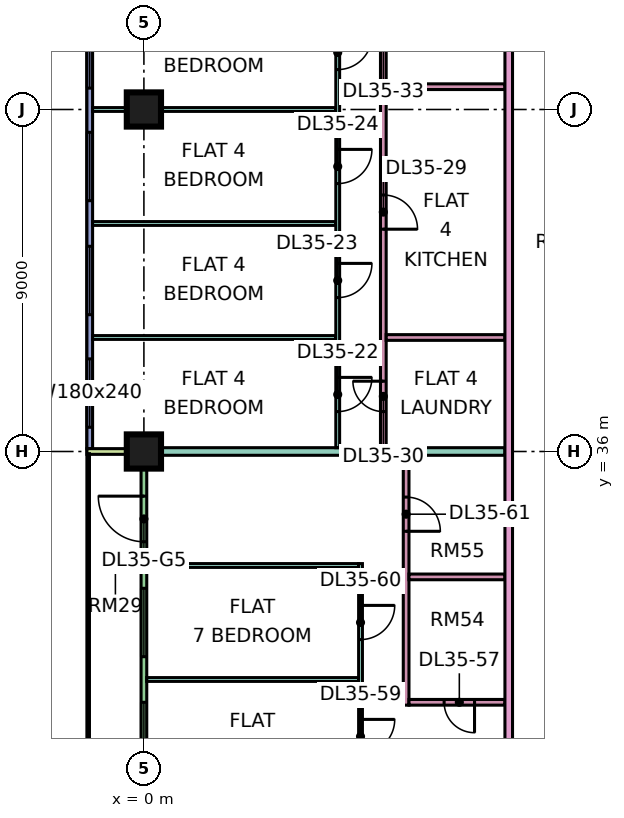
"""IFC4 building model, lengths in metres.
Left out: names, types, materials, properties, quantities, classifications, styles, units other than length and angle.
Written with IfcOpenShell. Run it as: python <this file> out.ifc"""

import sys

from ifc_helpers import new_model, si_unit, direction, frame, frame_2d, origin, origin_2d, place, context, subcontext, project, spatial, rectangle, extrude, element, fill, save


model = new_model("IFC4")
c1 = context("Model", 3, precision=1e-05, world=origin(), true_north=direction((0.0, 1.0)))
c2 = subcontext(c1, "Body", "Model", "MODEL_VIEW")
j1 = project(units=[si_unit("LENGTHUNIT", "METRE"), si_unit("PLANEANGLEUNIT", "RADIAN")], contexts=[c1])
p1 = place(None, origin())
s1 = spatial("IfcSite", under=j1, at=p1, CompositionType="ELEMENT")
p2 = place(p1, origin())
s2 = spatial("IfcBuilding", under=s1, at=p2, CompositionType="ELEMENT")
p3 = place(p2, frame((0.0, 0.0, 157.4)))
s3 = spatial("IfcBuildingStorey", under=s2, at=p3, CompositionType="ELEMENT", Elevation=157.4)
p4 = place(p3, frame((0.0, 36.0, 0.0), z_axis=(0.0, 0.0, 1.0), x_axis=(1.0, 0.0, 0.0)))
e1 = element("IfcColumn", 1, at=p4, inside=s3, PredefinedType="COLUMN", context=c2, shape_type="SweptSolid", body=[
    extrude(rectangle(XDim=0.9, YDim=0.9, at=origin_2d()), origin(), (0.0, 0.0, 1.0), 3.75),
])
p5 = place(p3, frame((0.0, 45.0, 0.0), z_axis=(0.0, 0.0, 1.0), x_axis=(1.0, 0.0, 0.0)))
e2 = element("IfcColumn", 2, at=p5, inside=s3, PredefinedType="COLUMN", context=c2, shape_type="SweptSolid", body=[
    extrude(rectangle(XDim=0.9, YDim=0.9, at=origin_2d()), origin(), (0.0, 0.0, 1.0), 3.75),
])
p6 = place(p3, frame((-1.425, 47.925, 0.0), z_axis=(0.0, 0.0, 1.0), x_axis=(0.0, -1.0, 0.0)))
e3 = element("IfcWall", 3, at=p6, inside=s3, PredefinedType="SOLIDWALL", context=c2, shape_type="SweptSolid", body=[
    extrude(rectangle(XDim=11.85, YDim=0.15, at=frame_2d((5.925, 0.0))), origin(), (0.0, 0.0, 1.0), 3.35),
])
p7 = place(p6, frame((0.562, 0.0, 0.45)))
e4 = element("IfcOpeningElement", 4, at=p7, cuts=e3, PredefinedType="OPENING", context=c2, shape_type="SweptSolid", body=[
    extrude(rectangle(XDim=1.8, YDim=2.4, at=frame_2d((0.9, 1.2))), frame((0.0, 0.085, 0.0), z_axis=(0.0, -1.0, 0.0), x_axis=(1.0, 0.0, 0.0)), (0.0, 0.0, 1.0), 0.17),
])
p8 = place(p6, frame((3.525, 0.0, 0.45)))
e5 = element("IfcOpeningElement", 5, at=p8, cuts=e3, PredefinedType="OPENING", context=c2, shape_type="SweptSolid", body=[
    extrude(rectangle(XDim=1.8, YDim=2.4, at=frame_2d((0.9, 1.2))), frame((0.0, 0.085, 0.0), z_axis=(0.0, -1.0, 0.0), x_axis=(1.0, 0.0, 0.0)), (0.0, 0.0, 1.0), 0.17),
])
p9 = place(p6, frame((6.525, 0.0, 0.45)))
e6 = element("IfcOpeningElement", 6, at=p9, cuts=e3, PredefinedType="OPENING", context=c2, shape_type="SweptSolid", body=[
    extrude(rectangle(XDim=1.8, YDim=2.4, at=frame_2d((0.9, 1.2))), frame((0.0, 0.085, 0.0), z_axis=(0.0, -1.0, 0.0), x_axis=(1.0, 0.0, 0.0)), (0.0, 0.0, 1.0), 0.17),
])
p10 = place(p6, frame((9.488, 0.0, 0.45)))
e7 = element("IfcOpeningElement", 7, at=p10, cuts=e3, PredefinedType="OPENING", context=c2, shape_type="SweptSolid", body=[
    extrude(rectangle(XDim=1.8, YDim=2.4, at=frame_2d((0.9, 1.2))), frame((0.0, 0.085, 0.0), z_axis=(0.0, -1.0, 0.0), x_axis=(1.0, 0.0, 0.0)), (0.0, 0.0, 1.0), 0.17),
])
p11 = place(p3, frame((0.0, 35.925, 0.0), z_axis=(0.0, 0.0, 1.0), x_axis=(0.0, -1.0, 0.0)))
e8 = element("IfcWall", 8, at=p11, inside=s3, PredefinedType="SOLIDWALL", context=c2, shape_type="SweptSolid", body=[
    extrude(rectangle(XDim=11.85, YDim=0.15, at=frame_2d((5.925, 0.0))), origin(), (0.0, 0.0, 1.0), 3.35),
])
p12 = place(p11, frame((1.1, 0.0, 0.0)))
e9 = element("IfcOpeningElement", 9, at=p12, cuts=e8, PredefinedType="OPENING", context=c2, shape_type="SweptSolid", body=[
    extrude(rectangle(XDim=1.2, YDim=2.4, at=frame_2d((0.6, 1.2))), frame((0.0, 0.085, 0.0), z_axis=(0.0, -1.0, 0.0), x_axis=(1.0, 0.0, 0.0)), (0.0, 0.0, 1.0), 0.17),
])
p13 = place(p11, frame((3.525, 0.0, 0.45)))
e10 = element("IfcOpeningElement", 10, at=p13, cuts=e8, PredefinedType="OPENING", context=c2, shape_type="SweptSolid", body=[
    extrude(rectangle(XDim=1.8, YDim=2.4, at=frame_2d((0.9, 1.2))), frame((0.0, 0.085, 0.0), z_axis=(0.0, -1.0, 0.0), x_axis=(1.0, 0.0, 0.0)), (0.0, 0.0, 1.0), 0.17),
])
p14 = place(p11, frame((6.525, 0.0, 0.45)))
e11 = element("IfcOpeningElement", 11, at=p14, cuts=e8, PredefinedType="OPENING", context=c2, shape_type="SweptSolid", body=[
    extrude(rectangle(XDim=1.8, YDim=2.4, at=frame_2d((0.9, 1.2))), frame((0.0, 0.085, 0.0), z_axis=(0.0, -1.0, 0.0), x_axis=(1.0, 0.0, 0.0)), (0.0, 0.0, 1.0), 0.17),
])
p15 = place(p11, frame((9.55, 0.0, 0.45)))
e12 = element("IfcOpeningElement", 12, at=p15, cuts=e8, PredefinedType="OPENING", context=c2, shape_type="SweptSolid", body=[
    extrude(rectangle(XDim=1.2, YDim=2.4, at=frame_2d((0.6, 1.2))), frame((0.0, 0.085, 0.0), z_axis=(0.0, -1.0, 0.0), x_axis=(1.0, 0.0, 0.0)), (0.0, 0.0, 1.0), 0.17),
])
p16 = place(p3, frame((-1.5, 36.0, 0.0), z_axis=(0.0, 0.0, 1.0), x_axis=(1.0, 0.0, 0.0)))
e13 = element("IfcWall", 13, at=p16, inside=s3, PredefinedType="SOLIDWALL", context=c2, shape_type="SweptSolid", body=[
    extrude(rectangle(XDim=1.5, YDim=0.15, at=frame_2d((0.75, 0.0))), origin(), (0.0, 0.0, 1.0), 3.35),
])
for number, where, z_axis, x_axis in (
    (14, (-1.351, 39.0, 0.0), (0.0, 0.0, 1.0), (1.0, 0.0, 0.0)),
    (15, (-1.351, 42.0, 0.0), (0.0, 0.0, 1.0), (1.0, 0.0, 0.0)),
    (16, (-1.351, 45.0, 0.0), (0.0, 0.0, 1.0), (1.0, 0.0, 0.0)),
):
    element("IfcWall", number, at=place(p3, frame(where, z_axis=z_axis, x_axis=x_axis)), inside=s3, PredefinedType="PARTITIONING", context=c2, shape_type="SweptSolid", body=[
        extrude(rectangle(XDim=6.401, YDim=0.1, at=frame_2d((3.201, 0.0))), origin(), (0.0, 0.0, 1.0), 3.35),
    ])
e17 = element("IfcWall", 17, at=p4, inside=s3, PredefinedType="PARTITIONING", context=c2, shape_type="SweptSolid", body=[
    extrude(rectangle(XDim=9.5, YDim=0.2, at=frame_2d((4.75, 0.0))), origin(), (0.0, 0.0, 1.0), 3.35),
])
for number, where, z_axis, x_axis in (
    (18, (0.074, 30.0, 0.0), (0.0, 0.0, 1.0), (1.0, 0.0, 0.0)),
    (19, (0.074, 33.0, 0.0), (0.0, 0.0, 1.0), (1.0, 0.0, 0.0)),
):
    element("IfcWall", number, at=place(p3, frame(where, z_axis=z_axis, x_axis=x_axis)), inside=s3, PredefinedType="PARTITIONING", context=c2, shape_type="SweptSolid", body=[
        extrude(rectangle(XDim=5.576, YDim=0.1, at=frame_2d((2.788, 0.0))), origin(), (0.0, 0.0, 1.0), 3.35),
    ])
p17 = place(p3, frame((5.1, 36.1, 0.0), z_axis=(0.0, 0.0, 1.0), x_axis=(0.0, 1.0, 0.0)))
e20 = element("IfcWall", 20, at=p17, inside=s3, PredefinedType="PARTITIONING", context=c2, shape_type="SweptSolid", body=[
    extrude(rectangle(XDim=26.826, YDim=0.1, at=frame_2d((13.413, 0.0))), origin(), (0.0, 0.0, 1.0), 3.35),
])
p18 = place(p17, frame((0.95, 0.0, 0.0)))
e21 = element("IfcOpeningElement", 21, at=p18, cuts=e20, PredefinedType="OPENING", context=c2, shape_type="SweptSolid", body=[
    extrude(rectangle(XDim=0.9, YDim=2.1, at=frame_2d((0.45, 1.05))), frame((0.0, 0.06, 0.0), z_axis=(0.0, -1.0, 0.0), x_axis=(1.0, 0.0, 0.0)), (0.0, 0.0, 1.0), 0.12),
])
p19 = place(p17, frame((3.95, 0.0, 0.0)))
e22 = element("IfcOpeningElement", 22, at=p19, cuts=e20, PredefinedType="OPENING", context=c2, shape_type="SweptSolid", body=[
    extrude(rectangle(XDim=0.9, YDim=2.1, at=frame_2d((0.45, 1.05))), frame((0.0, 0.06, 0.0), z_axis=(0.0, -1.0, 0.0), x_axis=(1.0, 0.0, 0.0)), (0.0, 0.0, 1.0), 0.12),
])
p20 = place(p17, frame((6.95, 0.0, 0.0)))
e23 = element("IfcOpeningElement", 23, at=p20, cuts=e20, PredefinedType="OPENING", context=c2, shape_type="SweptSolid", body=[
    extrude(rectangle(XDim=0.9, YDim=2.1, at=frame_2d((0.45, 1.05))), frame((0.0, 0.06, 0.0), z_axis=(0.0, -1.0, 0.0), x_axis=(1.0, 0.0, 0.0)), (0.0, 0.0, 1.0), 0.12),
])
p21 = place(p17, frame((9.95, 0.0, 0.0)))
e24 = element("IfcOpeningElement", 24, at=p21, cuts=e20, PredefinedType="OPENING", context=c2, shape_type="SweptSolid", body=[
    extrude(rectangle(XDim=0.9, YDim=2.1, at=frame_2d((0.45, 1.05))), frame((0.0, 0.06, 0.0), z_axis=(0.0, -1.0, 0.0), x_axis=(1.0, 0.0, 0.0)), (0.0, 0.0, 1.0), 0.12),
])
p22 = place(p17, frame((21.95, 0.0, 0.0)))
e25 = element("IfcOpeningElement", 25, at=p22, cuts=e20, PredefinedType="OPENING", context=c2, shape_type="SweptSolid", body=[
    extrude(rectangle(XDim=0.9, YDim=2.1, at=frame_2d((0.45, 1.05))), frame((0.0, 0.06, 0.0), z_axis=(0.0, -1.0, 0.0), x_axis=(1.0, 0.0, 0.0)), (0.0, 0.0, 1.0), 0.12),
])
p23 = place(p17, frame((15.95, 0.0, 0.0)))
e26 = element("IfcOpeningElement", 26, at=p23, cuts=e20, PredefinedType="OPENING", context=c2, shape_type="SweptSolid", body=[
    extrude(rectangle(XDim=0.9, YDim=2.1, at=frame_2d((0.45, 1.05))), frame((0.0, 0.06, 0.0), z_axis=(0.0, -1.0, 0.0), x_axis=(1.0, 0.0, 0.0)), (0.0, 0.0, 1.0), 0.12),
])
p24 = place(p17, frame((24.95, 0.0, 0.0)))
e27 = element("IfcOpeningElement", 27, at=p24, cuts=e20, PredefinedType="OPENING", context=c2, shape_type="SweptSolid", body=[
    extrude(rectangle(XDim=0.9, YDim=2.1, at=frame_2d((0.45, 1.05))), frame((0.0, 0.06, 0.0), z_axis=(0.0, -1.0, 0.0), x_axis=(1.0, 0.0, 0.0)), (0.0, 0.0, 1.0), 0.12),
])
p25 = place(p3, frame((5.7, 22.5, 0.0), z_axis=(0.0, 0.0, 1.0), x_axis=(0.0, 1.0, 0.0)))
e28 = element("IfcWall", 28, at=p25, inside=s3, PredefinedType="PARTITIONING", context=c2, shape_type="SweptSolid", body=[
    extrude(rectangle(XDim=10.55, YDim=0.1, at=frame_2d((5.275, 0.0))), origin(), (0.0, 0.0, 1.0), 3.35),
])
p26 = place(p25, frame((1.8, 0.0, 0.0)))
e29 = element("IfcOpeningElement", 29, at=p26, cuts=e28, PredefinedType="OPENING", context=c2, shape_type="SweptSolid", body=[
    extrude(rectangle(XDim=0.9, YDim=2.1, at=frame_2d((0.45, 1.05))), frame((0.0, 0.06, 0.0), z_axis=(0.0, -1.0, 0.0), x_axis=(1.0, 0.0, 0.0)), (0.0, 0.0, 1.0), 0.12),
])
p27 = place(p25, frame((5.55, 0.0, 0.0)))
e30 = element("IfcOpeningElement", 30, at=p27, cuts=e28, PredefinedType="OPENING", context=c2, shape_type="SweptSolid", body=[
    extrude(rectangle(XDim=0.9, YDim=2.1, at=frame_2d((0.45, 1.05))), frame((0.0, 0.06, 0.0), z_axis=(0.0, -1.0, 0.0), x_axis=(1.0, 0.0, 0.0)), (0.0, 0.0, 1.0), 0.12),
])
p28 = place(p25, frame((8.55, 0.0, 0.0)))
e31 = element("IfcOpeningElement", 31, at=p28, cuts=e28, PredefinedType="OPENING", context=c2, shape_type="SweptSolid", body=[
    extrude(rectangle(XDim=0.9, YDim=2.1, at=frame_2d((0.45, 1.05))), frame((0.0, 0.06, 0.0), z_axis=(0.0, -1.0, 0.0), x_axis=(1.0, 0.0, 0.0)), (0.0, 0.0, 1.0), 0.12),
])
p29 = place(p3, frame((6.3, 36.1, 0.0), z_axis=(0.0, 0.0, 1.0), x_axis=(0.0, 1.0, 0.0)))
e32 = element("IfcWall", 32, at=p29, inside=s3, PredefinedType="PARTITIONING", context=c2, shape_type="SweptSolid", body=[
    extrude(rectangle(XDim=23.65, YDim=0.15, at=frame_2d((11.825, 0.0))), origin(), (0.0, 0.0, 1.0), 3.35),
])
p30 = place(p29, frame((15.95, 0.0, 0.0)))
e33 = element("IfcOpeningElement", 33, at=p30, cuts=e32, PredefinedType="OPENING", context=c2, shape_type="SweptSolid", body=[
    extrude(rectangle(XDim=0.8, YDim=2.1, at=frame_2d((0.4, 1.05))), frame((0.0, 0.085, 0.0), z_axis=(0.0, -1.0, 0.0), x_axis=(1.0, 0.0, 0.0)), (0.0, 0.0, 1.0), 0.17),
])
p31 = place(p29, frame((5.75, 0.0, 0.0)))
e34 = element("IfcOpeningElement", 34, at=p31, cuts=e32, PredefinedType="OPENING", context=c2, shape_type="SweptSolid", body=[
    extrude(rectangle(XDim=0.9, YDim=2.1, at=frame_2d((0.45, 1.05))), frame((0.0, 0.085, 0.0), z_axis=(0.0, -1.0, 0.0), x_axis=(1.0, 0.0, 0.0)), (0.0, 0.0, 1.0), 0.17),
])
p32 = place(p29, frame((0.95, 0.0, 0.0)))
e35 = element("IfcOpeningElement", 35, at=p32, cuts=e32, PredefinedType="OPENING", context=c2, shape_type="SweptSolid", body=[
    extrude(rectangle(XDim=0.8, YDim=2.1, at=frame_2d((0.4, 1.05))), frame((0.0, 0.085, 0.0), z_axis=(0.0, -1.0, 0.0), x_axis=(1.0, 0.0, 0.0)), (0.0, 0.0, 1.0), 0.17),
])
p33 = place(p29, frame((10.55, 0.0, 0.0)))
e36 = element("IfcOpeningElement", 36, at=p33, cuts=e32, PredefinedType="OPENING", context=c2, shape_type="SweptSolid", body=[
    extrude(rectangle(XDim=0.8, YDim=2.1, at=frame_2d((0.4, 1.05))), frame((0.0, 0.085, 0.0), z_axis=(0.0, -1.0, 0.0), x_axis=(1.0, 0.0, 0.0)), (0.0, 0.0, 1.0), 0.17),
])
p34 = place(p29, frame((13.4, 0.0, 0.0)))
e37 = element("IfcOpeningElement", 37, at=p34, cuts=e32, PredefinedType="OPENING", context=c2, shape_type="SweptSolid", body=[
    extrude(rectangle(XDim=0.8, YDim=2.1, at=frame_2d((0.4, 1.05))), frame((0.0, 0.085, 0.0), z_axis=(0.0, -1.0, 0.0), x_axis=(1.0, 0.0, 0.0)), (0.0, 0.0, 1.0), 0.17),
])
for number, where, z_axis, x_axis in (
    (38, (6.375, 39.0, 0.0), (0.0, 0.0, 1.0), (1.0, 0.0, 0.0)),
    (39, (6.375, 45.6, 0.0), (0.0, 0.0, 1.0), (1.0, 0.0, 0.0)),
):
    element("IfcWall", number, at=place(p3, frame(where, z_axis=z_axis, x_axis=x_axis)), inside=s3, PredefinedType="PARTITIONING", context=c2, shape_type="SweptSolid", body=[
        extrude(rectangle(XDim=3.125, YDim=0.15, at=frame_2d((1.562, 0.0))), origin(), (0.0, 0.0, 1.0), 3.35),
    ])
p35 = place(p3, frame((6.9, 29.325, 0.0), z_axis=(0.0, 0.0, 1.0), x_axis=(0.0, 1.0, 0.0)))
e40 = element("IfcWall", 40, at=p35, inside=s3, PredefinedType="PARTITIONING", context=c2, shape_type="SweptSolid", body=[
    extrude(rectangle(XDim=6.575, YDim=0.15, at=frame_2d((3.288, 0.0))), origin(), (0.0, 0.0, 1.0), 3.35),
])
p36 = place(p35, frame((4.575, 0.0, 0.0)))
e41 = element("IfcOpeningElement", 41, at=p36, cuts=e40, PredefinedType="OPENING", context=c2, shape_type="SweptSolid", body=[
    extrude(rectangle(XDim=0.9, YDim=2.1, at=frame_2d((0.45, 1.05))), frame((0.0, 0.085, 0.0), z_axis=(0.0, -1.0, 0.0), x_axis=(1.0, 0.0, 0.0)), (0.0, 0.0, 1.0), 0.17),
])
p37 = place(p3, frame((6.975, 29.4, 0.0), z_axis=(0.0, 0.0, 1.0), x_axis=(1.0, 0.0, 0.0)))
e42 = element("IfcWall", 42, at=p37, inside=s3, PredefinedType="PARTITIONING", context=c2, shape_type="SweptSolid", body=[
    extrude(rectangle(XDim=2.525, YDim=0.15, at=frame_2d((1.262, 0.0))), origin(), (0.0, 0.0, 1.0), 3.35),
])
p38 = place(p37, frame((0.925, 0.0, 0.0)))
e43 = element("IfcOpeningElement", 43, at=p38, cuts=e42, PredefinedType="OPENING", context=c2, shape_type="SweptSolid", body=[
    extrude(rectangle(XDim=0.8, YDim=2.1, at=frame_2d((0.4, 1.05))), frame((0.0, 0.085, 0.0), z_axis=(0.0, -1.0, 0.0), x_axis=(1.0, 0.0, 0.0)), (0.0, 0.0, 1.0), 0.17),
])
p39 = place(p3, frame((6.975, 32.7, 0.0), z_axis=(0.0, 0.0, 1.0), x_axis=(1.0, 0.0, 0.0)))
e44 = element("IfcWall", 44, at=p39, inside=s3, PredefinedType="PARTITIONING", context=c2, shape_type="SweptSolid", body=[
    extrude(rectangle(XDim=2.525, YDim=0.15, at=frame_2d((1.262, 0.0))), origin(), (0.0, 0.0, 1.0), 3.35),
])
p40 = place(p3, frame((9.6, 20.0, 0.0), z_axis=(0.0, 0.0, 1.0), x_axis=(0.0, 1.0, 0.0)))
e45 = element("IfcWall", 45, at=p40, inside=s3, PredefinedType="PARTITIONING", context=c2, shape_type="SweptSolid", body=[
    extrude(rectangle(XDim=42.926, YDim=0.2, at=frame_2d((21.463, 0.0))), origin(), (0.0, 0.0, 1.0), 3.35),
])
p41 = place(p40, frame((40.8, 0.0, 0.0)))
e46 = element("IfcOpeningElement", 46, at=p41, cuts=e45, PredefinedType="OPENING", context=c2, shape_type="SweptSolid", body=[
    extrude(rectangle(XDim=1.0, YDim=2.1, at=frame_2d((0.5, 1.05))), frame((0.0, 0.11, 0.0), z_axis=(0.0, -1.0, 0.0), x_axis=(1.0, 0.0, 0.0)), (0.0, 0.0, 1.0), 0.22),
])
p42 = place(p40, frame((0.6, 0.0, 0.0)))
e47 = element("IfcOpeningElement", 47, at=p42, cuts=e45, PredefinedType="OPENING", context=c2, shape_type="SweptSolid", body=[
    extrude(rectangle(XDim=1.2, YDim=2.1, at=frame_2d((0.6, 1.05))), frame((0.0, 0.11, 0.0), z_axis=(0.0, -1.0, 0.0), x_axis=(1.0, 0.0, 0.0)), (0.0, 0.0, 1.0), 0.22),
])
p43 = place(p40, frame((3.9, 0.0, 0.0)))
e48 = element("IfcOpeningElement", 48, at=p43, cuts=e45, PredefinedType="OPENING", context=c2, shape_type="SweptSolid", body=[
    extrude(rectangle(XDim=1.0, YDim=2.1, at=frame_2d((0.5, 1.05))), frame((0.0, 0.11, 0.0), z_axis=(0.0, -1.0, 0.0), x_axis=(1.0, 0.0, 0.0)), (0.0, 0.0, 1.0), 0.22),
])
p44 = place(p7, origin())
e49 = element("IfcWindow", 49, at=p44, inside=s3, PartitioningType="SINGLE_PANEL", PredefinedType="WINDOW", context=c2, shape_type="SweptSolid", body=[
    extrude(rectangle(XDim=1.8, YDim=2.4, at=frame_2d((0.9, 1.2))), frame((0.0, 0.03, 0.0), z_axis=(0.0, -1.0, 0.0), x_axis=(1.0, 0.0, 0.0)), (0.0, 0.0, 1.0), 0.06),
])
fill(e4, e49)
p45 = place(p8, origin())
e50 = element("IfcWindow", 50, at=p45, inside=s3, PartitioningType="SINGLE_PANEL", PredefinedType="WINDOW", context=c2, shape_type="SweptSolid", body=[
    extrude(rectangle(XDim=1.8, YDim=2.4, at=frame_2d((0.9, 1.2))), frame((0.0, 0.03, 0.0), z_axis=(0.0, -1.0, 0.0), x_axis=(1.0, 0.0, 0.0)), (0.0, 0.0, 1.0), 0.06),
])
fill(e5, e50)
p46 = place(p9, origin())
e51 = element("IfcWindow", 51, at=p46, inside=s3, PartitioningType="SINGLE_PANEL", PredefinedType="WINDOW", context=c2, shape_type="SweptSolid", body=[
    extrude(rectangle(XDim=1.8, YDim=2.4, at=frame_2d((0.9, 1.2))), frame((0.0, 0.03, 0.0), z_axis=(0.0, -1.0, 0.0), x_axis=(1.0, 0.0, 0.0)), (0.0, 0.0, 1.0), 0.06),
])
fill(e6, e51)
p47 = place(p10, origin())
e52 = element("IfcWindow", 52, at=p47, inside=s3, PartitioningType="SINGLE_PANEL", PredefinedType="WINDOW", context=c2, shape_type="SweptSolid", body=[
    extrude(rectangle(XDim=1.8, YDim=2.4, at=frame_2d((0.9, 1.2))), frame((0.0, 0.03, 0.0), z_axis=(0.0, -1.0, 0.0), x_axis=(1.0, 0.0, 0.0)), (0.0, 0.0, 1.0), 0.06),
])
fill(e7, e52)
p48 = place(p12, frame((1.2, 0.0, 0.0), z_axis=(0.0, 0.0, 1.0), x_axis=(-1.0, 0.0, 0.0)))
e53 = element("IfcDoor", 53, at=p48, inside=s3, OperationType="DOUBLE_DOOR_SINGLE_SWING", PredefinedType="DOOR", context=c2, shape_type="SweptSolid", body=[
    extrude(rectangle(XDim=1.2, YDim=2.4, at=frame_2d((0.6, 1.2))), frame((0.0, 0.025, 0.0), z_axis=(0.0, -1.0, 0.0), x_axis=(1.0, 0.0, 0.0)), (0.0, 0.0, 1.0), 0.05),
])
fill(e9, e53)
p49 = place(p13, origin())
e54 = element("IfcWindow", 54, at=p49, inside=s3, PartitioningType="SINGLE_PANEL", PredefinedType="WINDOW", context=c2, shape_type="SweptSolid", body=[
    extrude(rectangle(XDim=1.8, YDim=2.4, at=frame_2d((0.9, 1.2))), frame((0.0, 0.03, 0.0), z_axis=(0.0, -1.0, 0.0), x_axis=(1.0, 0.0, 0.0)), (0.0, 0.0, 1.0), 0.06),
])
fill(e10, e54)
p50 = place(p14, origin())
e55 = element("IfcWindow", 55, at=p50, inside=s3, PartitioningType="SINGLE_PANEL", PredefinedType="WINDOW", context=c2, shape_type="SweptSolid", body=[
    extrude(rectangle(XDim=1.8, YDim=2.4, at=frame_2d((0.9, 1.2))), frame((0.0, 0.03, 0.0), z_axis=(0.0, -1.0, 0.0), x_axis=(1.0, 0.0, 0.0)), (0.0, 0.0, 1.0), 0.06),
])
fill(e11, e55)
p51 = place(p18, origin())
e56 = element("IfcDoor", 56, at=p51, inside=s3, OperationType="SINGLE_SWING_RIGHT", PredefinedType="DOOR", context=c2, shape_type="SweptSolid", body=[
    extrude(rectangle(XDim=0.9, YDim=2.1, at=frame_2d((0.45, 1.05))), frame((0.0, 0.025, 0.0), z_axis=(0.0, -1.0, 0.0), x_axis=(1.0, 0.0, 0.0)), (0.0, 0.0, 1.0), 0.05),
])
fill(e21, e56)
p52 = place(p19, origin())
e57 = element("IfcDoor", 57, at=p52, inside=s3, OperationType="SINGLE_SWING_RIGHT", PredefinedType="DOOR", context=c2, shape_type="SweptSolid", body=[
    extrude(rectangle(XDim=0.9, YDim=2.1, at=frame_2d((0.45, 1.05))), frame((0.0, 0.025, 0.0), z_axis=(0.0, -1.0, 0.0), x_axis=(1.0, 0.0, 0.0)), (0.0, 0.0, 1.0), 0.05),
])
fill(e22, e57)
p53 = place(p20, origin())
e58 = element("IfcDoor", 58, at=p53, inside=s3, OperationType="SINGLE_SWING_RIGHT", PredefinedType="DOOR", context=c2, shape_type="SweptSolid", body=[
    extrude(rectangle(XDim=0.9, YDim=2.1, at=frame_2d((0.45, 1.05))), frame((0.0, 0.025, 0.0), z_axis=(0.0, -1.0, 0.0), x_axis=(1.0, 0.0, 0.0)), (0.0, 0.0, 1.0), 0.05),
])
fill(e23, e58)
p54 = place(p21, origin())
e59 = element("IfcDoor", 59, at=p54, inside=s3, OperationType="SINGLE_SWING_RIGHT", PredefinedType="DOOR", context=c2, shape_type="SweptSolid", body=[
    extrude(rectangle(XDim=0.9, YDim=2.1, at=frame_2d((0.45, 1.05))), frame((0.0, 0.025, 0.0), z_axis=(0.0, -1.0, 0.0), x_axis=(1.0, 0.0, 0.0)), (0.0, 0.0, 1.0), 0.05),
])
fill(e24, e59)
p55 = place(p31, frame((0.9, 0.0, 0.0), z_axis=(0.0, 0.0, 1.0), x_axis=(-1.0, 0.0, 0.0)))
e60 = element("IfcDoor", 60, at=p55, inside=s3, OperationType="SINGLE_SWING_LEFT", PredefinedType="DOOR", context=c2, shape_type="SweptSolid", body=[
    extrude(rectangle(XDim=0.9, YDim=2.1, at=frame_2d((0.45, 1.05))), frame((0.0, 0.025, 0.0), z_axis=(0.0, -1.0, 0.0), x_axis=(1.0, 0.0, 0.0)), (0.0, 0.0, 1.0), 0.05),
])
fill(e34, e60)
p56 = place(p32, frame((0.8, 0.0, 0.0), z_axis=(0.0, 0.0, 1.0), x_axis=(-1.0, 0.0, 0.0)))
e61 = element("IfcDoor", 61, at=p56, inside=s3, OperationType="SINGLE_SWING_RIGHT", PredefinedType="DOOR", context=c2, shape_type="SweptSolid", body=[
    extrude(rectangle(XDim=0.8, YDim=2.1, at=frame_2d((0.4, 1.05))), frame((0.0, 0.025, 0.0), z_axis=(0.0, -1.0, 0.0), x_axis=(1.0, 0.0, 0.0)), (0.0, 0.0, 1.0), 0.05),
])
fill(e35, e61)
p57 = place(p38, origin())
e62 = element("IfcDoor", 62, at=p57, inside=s3, OperationType="SINGLE_SWING_RIGHT", PredefinedType="DOOR", context=c2, shape_type="SweptSolid", body=[
    extrude(rectangle(XDim=0.8, YDim=2.1, at=frame_2d((0.4, 1.05))), frame((0.0, 0.025, 0.0), z_axis=(0.0, -1.0, 0.0), x_axis=(1.0, 0.0, 0.0)), (0.0, 0.0, 1.0), 0.05),
])
fill(e43, e62)
p58 = place(p27, origin())
e63 = element("IfcDoor", 63, at=p58, inside=s3, OperationType="SINGLE_SWING_RIGHT", PredefinedType="DOOR", context=c2, shape_type="SweptSolid", body=[
    extrude(rectangle(XDim=0.9, YDim=2.1, at=frame_2d((0.45, 1.05))), frame((0.0, 0.025, 0.0), z_axis=(0.0, -1.0, 0.0), x_axis=(1.0, 0.0, 0.0)), (0.0, 0.0, 1.0), 0.05),
])
fill(e30, e63)
p59 = place(p28, origin())
e64 = element("IfcDoor", 64, at=p59, inside=s3, OperationType="SINGLE_SWING_RIGHT", PredefinedType="DOOR", context=c2, shape_type="SweptSolid", body=[
    extrude(rectangle(XDim=0.9, YDim=2.1, at=frame_2d((0.45, 1.05))), frame((0.0, 0.025, 0.0), z_axis=(0.0, -1.0, 0.0), x_axis=(1.0, 0.0, 0.0)), (0.0, 0.0, 1.0), 0.05),
])
fill(e31, e64)
p60 = place(p36, frame((0.9, 0.0, 0.0), z_axis=(0.0, 0.0, 1.0), x_axis=(-1.0, 0.0, 0.0)))
e65 = element("IfcDoor", 65, at=p60, inside=s3, OperationType="SINGLE_SWING_LEFT", PredefinedType="DOOR", context=c2, shape_type="SweptSolid", body=[
    extrude(rectangle(XDim=0.9, YDim=2.1, at=frame_2d((0.45, 1.05))), frame((0.0, 0.025, 0.0), z_axis=(0.0, -1.0, 0.0), x_axis=(1.0, 0.0, 0.0)), (0.0, 0.0, 1.0), 0.05),
])
fill(e41, e65)
save(model, sys.argv[1])
